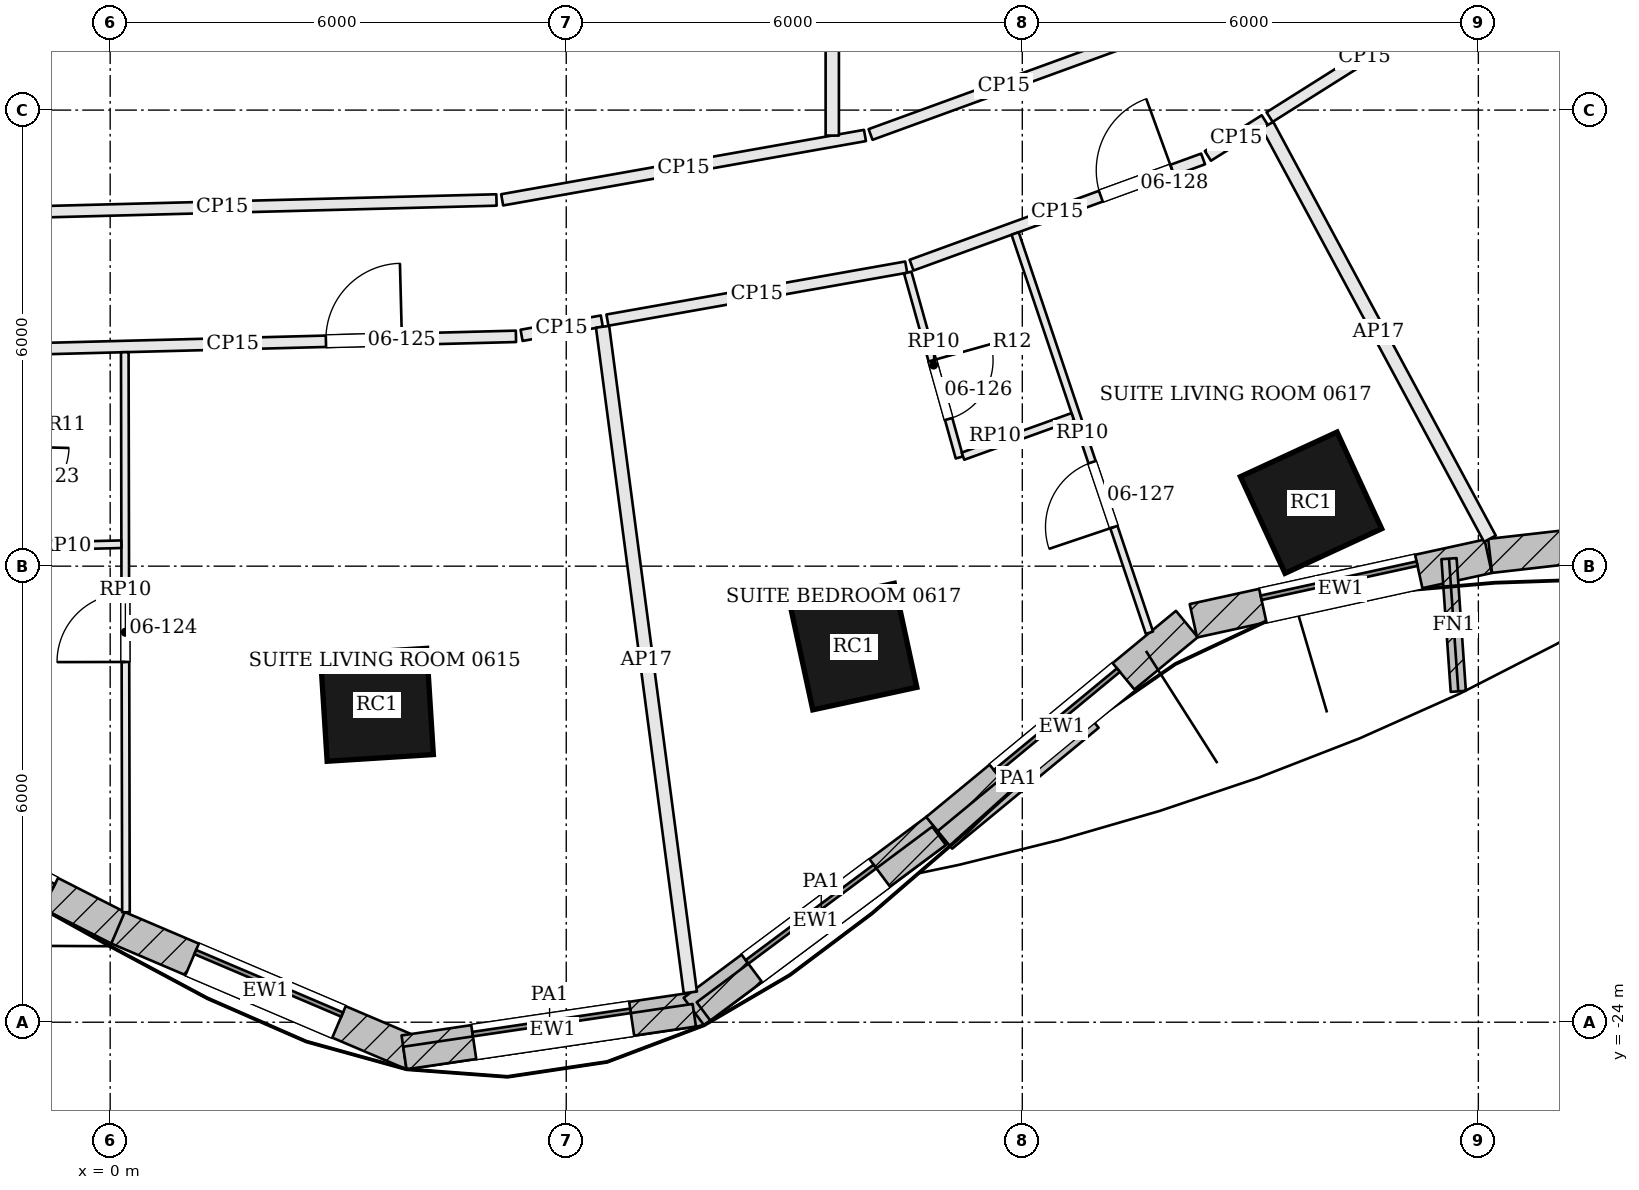
"""IFC4 building model, lengths in metres.
Left out: names, types, materials, properties, quantities, classifications, styles, units other than length and angle.
Written with IfcOpenShell. Run it as: python <this file> out.ifc"""

import sys

from ifc_helpers import new_model, si_unit, direction, frame, frame_2d, origin, origin_2d, place, context, subcontext, project, spatial, rectangle, extrude, element, fill, save


model = new_model("IFC4")
c1 = context("Model", 3, precision=1e-05, world=origin(), true_north=direction((0.0, 1.0)))
c2 = subcontext(c1, "Body", "Model", "MODEL_VIEW")
j1 = project(units=[si_unit("LENGTHUNIT", "METRE"), si_unit("PLANEANGLEUNIT", "RADIAN")], contexts=[c1])
p1 = place(None, origin())
s1 = spatial("IfcSite", under=j1, at=p1, CompositionType="ELEMENT")
p2 = place(p1, origin())
s2 = spatial("IfcBuilding", under=s1, at=p2, CompositionType="ELEMENT")
p3 = place(p2, frame((0.0, 0.0, 37.5)))
s3 = spatial("IfcBuildingStorey", under=s2, at=p3, CompositionType="ELEMENT", Elevation=37.5)
for number, where, z_axis, x_axis in (
    (1, (3.509, -19.824, 0.0), (0.0, 0.0, 1.0), (0.998, 0.063, 0.0)),
    (2, (9.78, -19.058, 0.0), (0.0, 0.0, 1.0), (0.977, 0.211, 0.0)),
    (3, (15.799, -17.165, 0.0), (0.0, 0.0, 1.0), (0.908, 0.419, 0.0)),
):
    element("IfcColumn", number, at=place(p3, frame(where, z_axis=z_axis, x_axis=x_axis)), inside=s3, PredefinedType="COLUMN", context=c2, shape_type="SweptSolid", body=[
        extrude(rectangle(XDim=1.4, YDim=1.4, at=origin_2d()), origin(), (0.0, 0.0, 1.0), 3.6),
    ])
p4 = place(p3, frame((-3.564, -20.889, 0.0), z_axis=(0.0, 0.0, 1.0), x_axis=(0.891033634447, -0.453937288933, 0.0)))
e4 = element("IfcWall", 4, at=p4, inside=s3, PredefinedType="SOLIDWALL", context=c2, shape_type="SweptSolid", body=[
    extrude(rectangle(XDim=4.132, YDim=0.45, at=frame_2d((2.066, 0.0))), origin(), (0.0, 0.0, 1.0), 3.4),
])
p5 = place(p4, frame((1.016, 0.0, 0.9)))
e5 = element("IfcOpeningElement", 5, at=p5, cuts=e4, PredefinedType="OPENING", context=c2, shape_type="SweptSolid", body=[
    extrude(rectangle(XDim=2.1, YDim=2.0, at=frame_2d((1.05, 1.0))), frame((0.0, 0.235, 0.0), z_axis=(0.0, -1.0, 0.0), x_axis=(1.0, 0.0, 0.0)), (0.0, 0.0, 1.0), 0.47),
])
p6 = place(p3, frame((0.103, -22.758, 0.0), z_axis=(0.0, 0.0, 1.0), x_axis=(0.920037498786, -0.391830321475, 0.0)))
e6 = element("IfcWall", 6, at=p6, inside=s3, PredefinedType="SOLIDWALL", context=c2, shape_type="SweptSolid", body=[
    extrude(rectangle(XDim=4.219, YDim=0.45, at=frame_2d((2.11, 0.0))), origin(), (0.0, 0.0, 1.0), 3.4),
])
p7 = place(p6, frame((1.06, 0.0, 0.9)))
e7 = element("IfcOpeningElement", 7, at=p7, cuts=e6, PredefinedType="OPENING", context=c2, shape_type="SweptSolid", body=[
    extrude(rectangle(XDim=2.1, YDim=2.0, at=frame_2d((1.05, 1.0))), frame((0.0, 0.235, 0.0), z_axis=(0.0, -1.0, 0.0), x_axis=(1.0, 0.0, 0.0)), (0.0, 0.0, 1.0), 0.47),
])
p8 = place(p3, frame((3.866, -24.396, 0.0), z_axis=(0.0, 0.0, 1.0), x_axis=(0.989255112942, 0.146199594798, 0.0)))
e8 = element("IfcWall", 8, at=p8, inside=s3, PredefinedType="SOLIDWALL", context=c2, shape_type="SweptSolid", body=[
    extrude(rectangle(XDim=3.954, YDim=0.45, at=frame_2d((1.977, 0.0))), origin(), (0.0, 0.0, 1.0), 3.4),
])
p9 = place(p8, frame((0.927, 0.0, 0.9)))
e9 = element("IfcOpeningElement", 9, at=p9, cuts=e8, PredefinedType="OPENING", context=c2, shape_type="SweptSolid", body=[
    extrude(rectangle(XDim=2.1, YDim=2.0, at=frame_2d((1.05, 1.0))), frame((0.0, 0.235, 0.0), z_axis=(0.0, -1.0, 0.0), x_axis=(1.0, 0.0, 0.0)), (0.0, 0.0, 1.0), 0.47),
])
p10 = place(p3, frame((7.678, -23.859, 0.0), z_axis=(0.0, 0.0, 1.0), x_axis=(0.801665619573, 0.597772728046, 0.0)))
e10 = element("IfcWall", 10, at=p10, inside=s3, PredefinedType="SOLIDWALL", context=c2, shape_type="SweptSolid", body=[
    extrude(rectangle(XDim=4.003, YDim=0.45, at=frame_2d((2.001, 0.0))), origin(), (0.0, 0.0, 1.0), 3.4),
])
p11 = place(p10, frame((0.951, 0.0, 0.9)))
e11 = element("IfcOpeningElement", 11, at=p11, cuts=e10, PredefinedType="OPENING", context=c2, shape_type="SweptSolid", body=[
    extrude(rectangle(XDim=2.1, YDim=2.0, at=frame_2d((1.05, 1.0))), frame((0.0, 0.235, 0.0), z_axis=(0.0, -1.0, 0.0), x_axis=(1.0, 0.0, 0.0)), (0.0, 0.0, 1.0), 0.47),
])
p12 = place(p3, frame((10.879, -21.473, 0.0), z_axis=(0.0, 0.0, 1.0), x_axis=(0.77124668946, 0.636536365023, 0.0)))
e12 = element("IfcWall", 12, at=p12, inside=s3, PredefinedType="SOLIDWALL", context=c2, shape_type="SweptSolid", body=[
    extrude(rectangle(XDim=4.261, YDim=0.45, at=frame_2d((2.13, 0.0))), origin(), (0.0, 0.0, 1.0), 3.4),
])
p13 = place(p12, frame((1.08, 0.0, 0.9)))
e13 = element("IfcOpeningElement", 13, at=p13, cuts=e12, PredefinedType="OPENING", context=c2, shape_type="SweptSolid", body=[
    extrude(rectangle(XDim=2.1, YDim=2.0, at=frame_2d((1.05, 1.0))), frame((0.0, 0.235, 0.0), z_axis=(0.0, -1.0, 0.0), x_axis=(1.0, 0.0, 0.0)), (0.0, 0.0, 1.0), 0.47),
])
p14 = place(p3, frame((14.251, -18.718, 0.0), z_axis=(0.0, 0.0, 1.0), x_axis=(0.976903627618, 0.213680374267, 0.0)))
e14 = element("IfcWall", 14, at=p14, inside=s3, PredefinedType="SOLIDWALL", context=c2, shape_type="SweptSolid", body=[
    extrude(rectangle(XDim=3.97, YDim=0.45, at=frame_2d((1.985, 0.0))), origin(), (0.0, 0.0, 1.0), 3.4),
])
p15 = place(p14, frame((0.935, 0.0, 0.9)))
e15 = element("IfcOpeningElement", 15, at=p15, cuts=e14, PredefinedType="OPENING", context=c2, shape_type="SweptSolid", body=[
    extrude(rectangle(XDim=2.1, YDim=2.0, at=frame_2d((1.05, 1.0))), frame((0.0, 0.235, 0.0), z_axis=(0.0, -1.0, 0.0), x_axis=(1.0, 0.0, 0.0)), (0.0, 0.0, 1.0), 0.47),
])
p16 = place(p3, frame((18.154, -17.865, 0.0), z_axis=(0.0, 0.0, 1.0), x_axis=(0.993572909097, 0.113193967633, 0.0)))
e16 = element("IfcWall", 16, at=p16, inside=s3, PredefinedType="SOLIDWALL", context=c2, shape_type="SweptSolid", body=[
    extrude(rectangle(XDim=5.839, YDim=0.45, at=frame_2d((2.919, 0.0))), origin(), (0.0, 0.0, 1.0), 3.4),
])
p17 = place(p16, frame((1.869, 0.0, 0.9)))
e17 = element("IfcOpeningElement", 17, at=p17, cuts=e16, PredefinedType="OPENING", context=c2, shape_type="SweptSolid", body=[
    extrude(rectangle(XDim=2.1, YDim=2.0, at=frame_2d((1.05, 1.0))), frame((0.0, 0.235, 0.0), z_axis=(0.0, -1.0, 0.0), x_axis=(1.0, 0.0, 0.0)), (0.0, 0.0, 1.0), 0.47),
])
p18 = place(p3, frame((17.614, -17.901, 0.0), z_axis=(0.0, 0.0, 1.0), x_axis=(0.069750000204, -0.997564502913, 0.0)))
e18 = element("IfcWall", 18, at=p18, inside=s3, PredefinedType="SOLIDWALL", context=c2, shape_type="SweptSolid", body=[
    extrude(rectangle(XDim=1.75, YDim=0.2, at=frame_2d((0.875, 0.0))), origin(), (0.0, 0.0, 1.0), 3.4),
])
p19 = place(p3, frame((3.877, -24.471, 3.6), z_axis=(0.0, 0.0, 1.0), x_axis=(0.989252791024, 0.146215305118, 0.0)))
e19 = element("IfcWall", 19, at=p19, inside=s3, PredefinedType="PARAPET", context=c2, shape_type="SweptSolid", body=[
    extrude(rectangle(XDim=3.849, YDim=0.3, at=frame_2d((1.924, 0.0))), origin(), (0.0, 0.0, 1.0), 1.1),
])
p20 = place(p3, frame((7.806, -23.858, 3.6), z_axis=(0.0, 0.0, 1.0), x_axis=(0.801649538596, 0.597794293439, 0.0)))
e20 = element("IfcWall", 20, at=p20, inside=s3, PredefinedType="PARAPET", context=c2, shape_type="SweptSolid", body=[
    extrude(rectangle(XDim=3.865, YDim=0.3, at=frame_2d((1.932, 0.0))), origin(), (0.0, 0.0, 1.0), 1.1),
])
p21 = place(p3, frame((10.982, -21.601, 3.6), z_axis=(0.0, 0.0, 1.0), x_axis=(0.771295342686, 0.636477410715, 0.0)))
e21 = element("IfcWall", 21, at=p21, inside=s3, PredefinedType="PARAPET", context=c2, shape_type="SweptSolid", body=[
    extrude(rectangle(XDim=2.499, YDim=0.3, at=frame_2d((1.25, 0.0))), origin(), (0.0, 0.0, 1.0), 1.1),
])
p22 = place(p3, frame((-2.114, -15.17, 0.0), z_axis=(0.0, 0.0, 1.0), x_axis=(0.999661895531, 0.026001819598, 0.0)))
e22 = element("IfcWall", 22, at=p22, inside=s3, PredefinedType="PARTITIONING", context=c2, shape_type="SweptSolid", body=[
    extrude(rectangle(XDim=7.455, YDim=0.15, at=frame_2d((3.728, 0.0))), origin(), (0.0, 0.0, 1.0), 2.68),
])
p23 = place(p22, frame((4.954, 0.0, 0.0)))
e23 = element("IfcOpeningElement", 23, at=p23, cuts=e22, PredefinedType="OPENING", context=c2, shape_type="SweptSolid", body=[
    extrude(rectangle(XDim=1.0, YDim=2.1, at=frame_2d((0.5, 1.05))), frame((0.0, 0.085, 0.0), z_axis=(0.0, -1.0, 0.0), x_axis=(1.0, 0.0, 0.0)), (0.0, 0.0, 1.0), 0.17),
])
p24 = place(p3, frame((5.413, -14.963, 0.0), z_axis=(0.0, 0.0, 1.0), x_axis=(0.984622634161, 0.174694786121, 0.0)))
e24 = element("IfcWall", 24, at=p24, inside=s3, PredefinedType="PARTITIONING", context=c2, shape_type="SweptSolid", body=[
    extrude(rectangle(XDim=1.072, YDim=0.15, at=frame_2d((0.536, 0.0))), origin(), (0.0, 0.0, 1.0), 2.68),
])
p25 = place(p3, frame((7.633, -23.608, 0.0), z_axis=(0.0, 0.0, 1.0), x_axis=(-0.130729762954, 0.991418039516, 0.0)))
e25 = element("IfcWall", 25, at=p25, inside=s3, PredefinedType="PARTITIONING", context=c2, shape_type="SweptSolid", body=[
    extrude(rectangle(XDim=8.833, YDim=0.175, at=frame_2d((4.417, 0.0))), origin(), (0.0, 0.0, 1.0), 2.68),
])
p26 = place(p3, frame((6.542, -14.763, 0.0), z_axis=(0.0, 0.0, 1.0), x_axis=(0.984628016341, 0.174664448116, 0.0)))
e26 = element("IfcWall", 26, at=p26, inside=s3, PredefinedType="PARTITIONING", context=c2, shape_type="SweptSolid", body=[
    extrude(rectangle(XDim=3.992, YDim=0.15, at=frame_2d((1.996, 0.0))), origin(), (0.0, 0.0, 1.0), 2.68),
])
p27 = place(p3, frame((10.543, -14.04, 0.0), z_axis=(0.0, 0.0, 1.0), x_axis=(0.939576705301, 0.342338450741, 0.0)))
e27 = element("IfcWall", 27, at=p27, inside=s3, PredefinedType="PARTITIONING", context=c2, shape_type="SweptSolid", body=[
    extrude(rectangle(XDim=4.082, YDim=0.15, at=frame_2d((2.041, 0.0))), origin(), (0.0, 0.0, 1.0), 2.68),
])
p28 = place(p27, frame((2.65, 0.0, 0.0)))
e28 = element("IfcOpeningElement", 28, at=p28, cuts=e27, PredefinedType="OPENING", context=c2, shape_type="SweptSolid", body=[
    extrude(rectangle(XDim=1.0, YDim=2.1, at=frame_2d((0.5, 1.05))), frame((0.0, 0.085, 0.0), z_axis=(0.0, -1.0, 0.0), x_axis=(1.0, 0.0, 0.0)), (0.0, 0.0, 1.0), 0.17),
])
p29 = place(p3, frame((14.442, -12.603, 0.0), z_axis=(0.0, 0.0, 1.0), x_axis=(0.845928311112, 0.533296627084, 0.0)))
e29 = element("IfcWall", 29, at=p29, inside=s3, PredefinedType="PARTITIONING", context=c2, shape_type="SweptSolid", body=[
    extrude(rectangle(XDim=0.884, YDim=0.15, at=frame_2d((0.442, 0.0))), origin(), (0.0, 0.0, 1.0), 2.68),
])
p30 = place(p3, frame((18.152, -17.639, 0.0), z_axis=(0.0, 0.0, 1.0), x_axis=(-0.47366383337, 0.880705724381, 0.0)))
e30 = element("IfcWall", 30, at=p30, inside=s3, PredefinedType="PARTITIONING", context=c2, shape_type="SweptSolid", body=[
    extrude(rectangle(XDim=6.178, YDim=0.175, at=frame_2d((3.089, 0.0))), origin(), (0.0, 0.0, 1.0), 2.68),
])
p31 = place(p3, frame((15.253, -12.091, 0.0), z_axis=(0.0, 0.0, 1.0), x_axis=(0.846020362576, 0.533150584832, 0.0)))
e31 = element("IfcWall", 31, at=p31, inside=s3, PredefinedType="PARTITIONING", context=c2, shape_type="SweptSolid", body=[
    extrude(rectangle(XDim=2.956, YDim=0.15, at=frame_2d((1.478, 0.0))), origin(), (0.0, 0.0, 1.0), 2.68),
])
p32 = place(p3, frame((13.511, -11.043, 0.0), z_axis=(0.0, 0.0, 1.0), x_axis=(-0.939583191704, -0.342320647736, 0.0)))
e32 = element("IfcWall", 32, at=p32, inside=s3, PredefinedType="PARTITIONING", context=c2, shape_type="SweptSolid", body=[
    extrude(rectangle(XDim=3.733, YDim=0.15, at=frame_2d((1.866, 0.0))), origin(), (0.0, 0.0, 1.0), 2.68),
])
p33 = place(p3, frame((9.93, -12.334, 0.0), z_axis=(0.0, 0.0, 1.0), x_axis=(-0.984638212434, -0.174606960386, 0.0)))
e33 = element("IfcWall", 33, at=p33, inside=s3, PredefinedType="PARTITIONING", context=c2, shape_type="SweptSolid", body=[
    extrude(rectangle(XDim=4.848, YDim=0.15, at=frame_2d((2.424, 0.0))), origin(), (0.0, 0.0, 1.0), 2.68),
])
p34 = place(p3, frame((5.082, -13.182, 0.0), z_axis=(0.0, 0.0, 1.0), x_axis=(-0.999661624383, -0.026012242045, 0.0)))
e34 = element("IfcWall", 34, at=p34, inside=s3, PredefinedType="PARTITIONING", context=c2, shape_type="SweptSolid", body=[
    extrude(rectangle(XDim=7.218, YDim=0.15, at=frame_2d((3.609, 0.0))), origin(), (0.0, 0.0, 1.0), 2.68),
])
p35 = place(p3, frame((0.208, -22.553, 0.0), z_axis=(0.0, 0.0, 1.0), x_axis=(-0.002054404359, 0.999997889709, 0.0)))
e35 = element("IfcWall", 35, at=p35, inside=s3, PredefinedType="PARTITIONING", context=c2, shape_type="SweptSolid", body=[
    extrude(rectangle(XDim=7.368, YDim=0.1, at=frame_2d((3.684, 0.0))), origin(), (0.0, 0.0, 1.0), 2.884),
])
p36 = place(p35, frame((3.293, 0.0, 0.0)))
e36 = element("IfcOpeningElement", 36, at=p36, cuts=e35, PredefinedType="OPENING", context=c2, shape_type="SweptSolid", body=[
    extrude(rectangle(XDim=0.9, YDim=2.4, at=frame_2d((0.45, 1.2))), frame((0.0, 0.06, 0.0), z_axis=(0.0, -1.0, 0.0), x_axis=(1.0, 0.0, 0.0)), (0.0, 0.0, 1.0), 0.12),
])
p37 = place(p3, frame((-1.327, -17.747, 0.0), z_axis=(0.0, 0.0, 1.0), x_axis=(0.999707980688, 0.024165126686, 0.0)))
e37 = element("IfcWall", 37, at=p37, inside=s3, PredefinedType="PARTITIONING", context=c2, shape_type="SweptSolid", body=[
    extrude(rectangle(XDim=1.475, YDim=0.1, at=frame_2d((0.738, 0.0))), origin(), (0.0, 0.0, 1.0), 2.884),
])
p38 = place(p3, frame((13.673, -18.876, 0.0), z_axis=(0.0, 0.0, 1.0), x_axis=(-0.318869836417, 0.947798516259, 0.0)))
e38 = element("IfcWall", 38, at=p38, inside=s3, PredefinedType="PARTITIONING", context=c2, shape_type="SweptSolid", body=[
    extrude(rectangle(XDim=5.542, YDim=0.1, at=frame_2d((2.771, 0.0))), origin(), (0.0, 0.0, 1.0), 2.884),
])
p39 = place(p38, frame((1.467, 0.0, 0.0)))
e39 = element("IfcOpeningElement", 39, at=p39, cuts=e38, PredefinedType="OPENING", context=c2, shape_type="SweptSolid", body=[
    extrude(rectangle(XDim=0.9, YDim=2.4, at=frame_2d((0.45, 1.2))), frame((0.0, 0.06, 0.0), z_axis=(0.0, -1.0, 0.0), x_axis=(1.0, 0.0, 0.0)), (0.0, 0.0, 1.0), 0.12),
])
p40 = place(p3, frame((10.493, -14.138, 0.0), z_axis=(0.0, 0.0, 1.0), x_axis=(0.269174437276, -0.963091440268, 0.0)))
e40 = element("IfcWall", 40, at=p40, inside=s3, PredefinedType="PARTITIONING", context=c2, shape_type="SweptSolid", body=[
    extrude(rectangle(XDim=2.525, YDim=0.1, at=frame_2d((1.263, 0.0))), origin(), (0.0, 0.0, 1.0), 2.884),
])
p41 = place(p40, frame((1.2, 0.0, 0.0)))
e41 = element("IfcOpeningElement", 41, at=p41, cuts=e40, PredefinedType="OPENING", context=c2, shape_type="SweptSolid", body=[
    extrude(rectangle(XDim=0.8, YDim=2.1, at=frame_2d((0.4, 1.05))), frame((0.0, 0.06, 0.0), z_axis=(0.0, -1.0, 0.0), x_axis=(1.0, 0.0, 0.0)), (0.0, 0.0, 1.0), 0.12),
])
p42 = place(p3, frame((11.219, -16.553, 0.0), z_axis=(0.0, 0.0, 1.0), x_axis=(0.940976594902, 0.338471635218, 0.0)))
e42 = element("IfcWall", 42, at=p42, inside=s3, PredefinedType="PARTITIONING", context=c2, shape_type="SweptSolid", body=[
    extrude(rectangle(XDim=1.535, YDim=0.1, at=frame_2d((0.768, 0.0))), origin(), (0.0, 0.0, 1.0), 2.884),
])
p43 = place(p3, frame((18.73, -9.537, 0.0), z_axis=(0.0, 0.0, 1.0), x_axis=(0.731379942675, -0.68197021889, 0.0)))
e43 = element("IfcWall", 43, at=p43, inside=s3, PredefinedType="PARTITIONING", context=c2, shape_type="SweptSolid", body=[
    extrude(rectangle(XDim=2.525, YDim=0.1, at=frame_2d((1.262, 0.0))), origin(), (0.0, 0.0, 1.0), 2.884),
])
p44 = place(p43, frame((1.2, 0.0, 0.0)))
e44 = element("IfcOpeningElement", 44, at=p44, cuts=e43, PredefinedType="OPENING", context=c2, shape_type="SweptSolid", body=[
    extrude(rectangle(XDim=0.8, YDim=2.1, at=frame_2d((0.4, 1.05))), frame((0.0, 0.06, 0.0), z_axis=(0.0, -1.0, 0.0), x_axis=(1.0, 0.0, 0.0)), (0.0, 0.0, 1.0), 0.12),
])
p45 = place(p3, frame((9.5, -12.335, 0.0), z_axis=(0.0, 0.0, 1.0), x_axis=(0.0, 1.0, 0.0)))
e45 = element("IfcWall", 45, at=p45, inside=s3, PredefinedType="PARTITIONING", context=c2, shape_type="SweptSolid", body=[
    extrude(rectangle(XDim=7.46, YDim=0.175, at=frame_2d((3.73, 0.0))), origin(), (0.0, 0.0, 1.0), 2.68),
])
p46 = place(p5, origin())
e46 = element("IfcWindow", 46, at=p46, inside=s3, PartitioningType="SINGLE_PANEL", PredefinedType="WINDOW", context=c2, shape_type="SweptSolid", body=[
    extrude(rectangle(XDim=2.1, YDim=2.0, at=frame_2d((1.05, 1.0))), frame((0.0, 0.135, 0.0), z_axis=(0.0, -1.0, 0.0), x_axis=(1.0, 0.0, 0.0)), (0.0, 0.0, 1.0), 0.06),
])
fill(e5, e46)
p47 = place(p7, origin())
e47 = element("IfcWindow", 47, at=p47, inside=s3, PartitioningType="SINGLE_PANEL", PredefinedType="WINDOW", context=c2, shape_type="SweptSolid", body=[
    extrude(rectangle(XDim=2.1, YDim=2.0, at=frame_2d((1.05, 1.0))), frame((0.0, 0.135, 0.0), z_axis=(0.0, -1.0, 0.0), x_axis=(1.0, 0.0, 0.0)), (0.0, 0.0, 1.0), 0.06),
])
fill(e7, e47)
p48 = place(p9, origin())
e48 = element("IfcWindow", 48, at=p48, inside=s3, PartitioningType="SINGLE_PANEL", PredefinedType="WINDOW", context=c2, shape_type="SweptSolid", body=[
    extrude(rectangle(XDim=2.1, YDim=2.0, at=frame_2d((1.05, 1.0))), frame((0.0, 0.135, 0.0), z_axis=(0.0, -1.0, 0.0), x_axis=(1.0, 0.0, 0.0)), (0.0, 0.0, 1.0), 0.06),
])
fill(e9, e48)
p49 = place(p11, origin())
e49 = element("IfcWindow", 49, at=p49, inside=s3, PartitioningType="SINGLE_PANEL", PredefinedType="WINDOW", context=c2, shape_type="SweptSolid", body=[
    extrude(rectangle(XDim=2.1, YDim=2.0, at=frame_2d((1.05, 1.0))), frame((0.0, 0.135, 0.0), z_axis=(0.0, -1.0, 0.0), x_axis=(1.0, 0.0, 0.0)), (0.0, 0.0, 1.0), 0.06),
])
fill(e11, e49)
p50 = place(p13, origin())
e50 = element("IfcWindow", 50, at=p50, inside=s3, PartitioningType="SINGLE_PANEL", PredefinedType="WINDOW", context=c2, shape_type="SweptSolid", body=[
    extrude(rectangle(XDim=2.1, YDim=2.0, at=frame_2d((1.05, 1.0))), frame((0.0, 0.135, 0.0), z_axis=(0.0, -1.0, 0.0), x_axis=(1.0, 0.0, 0.0)), (0.0, 0.0, 1.0), 0.06),
])
fill(e13, e50)
p51 = place(p15, origin())
e51 = element("IfcWindow", 51, at=p51, inside=s3, PartitioningType="SINGLE_PANEL", PredefinedType="WINDOW", context=c2, shape_type="SweptSolid", body=[
    extrude(rectangle(XDim=2.1, YDim=2.0, at=frame_2d((1.05, 1.0))), frame((0.0, 0.135, 0.0), z_axis=(0.0, -1.0, 0.0), x_axis=(1.0, 0.0, 0.0)), (0.0, 0.0, 1.0), 0.06),
])
fill(e15, e51)
p52 = place(p36, origin())
e52 = element("IfcDoor", 52, at=p52, inside=s3, OperationType="SINGLE_SWING_LEFT", PredefinedType="DOOR", context=c2, shape_type="SweptSolid", body=[
    extrude(rectangle(XDim=0.9, YDim=2.4, at=frame_2d((0.45, 1.2))), frame((0.0, 0.025, 0.0), z_axis=(0.0, -1.0, 0.0), x_axis=(1.0, 0.0, 0.0)), (0.0, 0.0, 1.0), 0.05),
])
fill(e36, e52)
p53 = place(p23, origin())
e53 = element("IfcDoor", 53, at=p53, inside=s3, OperationType="SINGLE_SWING_RIGHT", PredefinedType="DOOR", context=c2, shape_type="SweptSolid", body=[
    extrude(rectangle(XDim=1.0, YDim=2.1, at=frame_2d((0.5, 1.05))), frame((0.0, 0.025, 0.0), z_axis=(0.0, -1.0, 0.0), x_axis=(1.0, 0.0, 0.0)), (0.0, 0.0, 1.0), 0.05),
])
fill(e23, e53)
p54 = place(p41, origin())
e54 = element("IfcDoor", 54, at=p54, inside=s3, OperationType="SINGLE_SWING_LEFT", PredefinedType="DOOR", context=c2, shape_type="SweptSolid", body=[
    extrude(rectangle(XDim=0.8, YDim=2.1, at=frame_2d((0.4, 1.05))), frame((0.0, 0.025, 0.0), z_axis=(0.0, -1.0, 0.0), x_axis=(1.0, 0.0, 0.0)), (0.0, 0.0, 1.0), 0.05),
])
fill(e41, e54)
p55 = place(p39, origin())
e55 = element("IfcDoor", 55, at=p55, inside=s3, OperationType="SINGLE_SWING_LEFT", PredefinedType="DOOR", context=c2, shape_type="SweptSolid", body=[
    extrude(rectangle(XDim=0.9, YDim=2.4, at=frame_2d((0.45, 1.2))), frame((0.0, 0.025, 0.0), z_axis=(0.0, -1.0, 0.0), x_axis=(1.0, 0.0, 0.0)), (0.0, 0.0, 1.0), 0.05),
])
fill(e39, e55)
p56 = place(p28, origin())
e56 = element("IfcDoor", 56, at=p56, inside=s3, OperationType="SINGLE_SWING_RIGHT", PredefinedType="DOOR", context=c2, shape_type="SweptSolid", body=[
    extrude(rectangle(XDim=1.0, YDim=2.1, at=frame_2d((0.5, 1.05))), frame((0.0, 0.025, 0.0), z_axis=(0.0, -1.0, 0.0), x_axis=(1.0, 0.0, 0.0)), (0.0, 0.0, 1.0), 0.05),
])
fill(e28, e56)
save(model, sys.argv[1])
